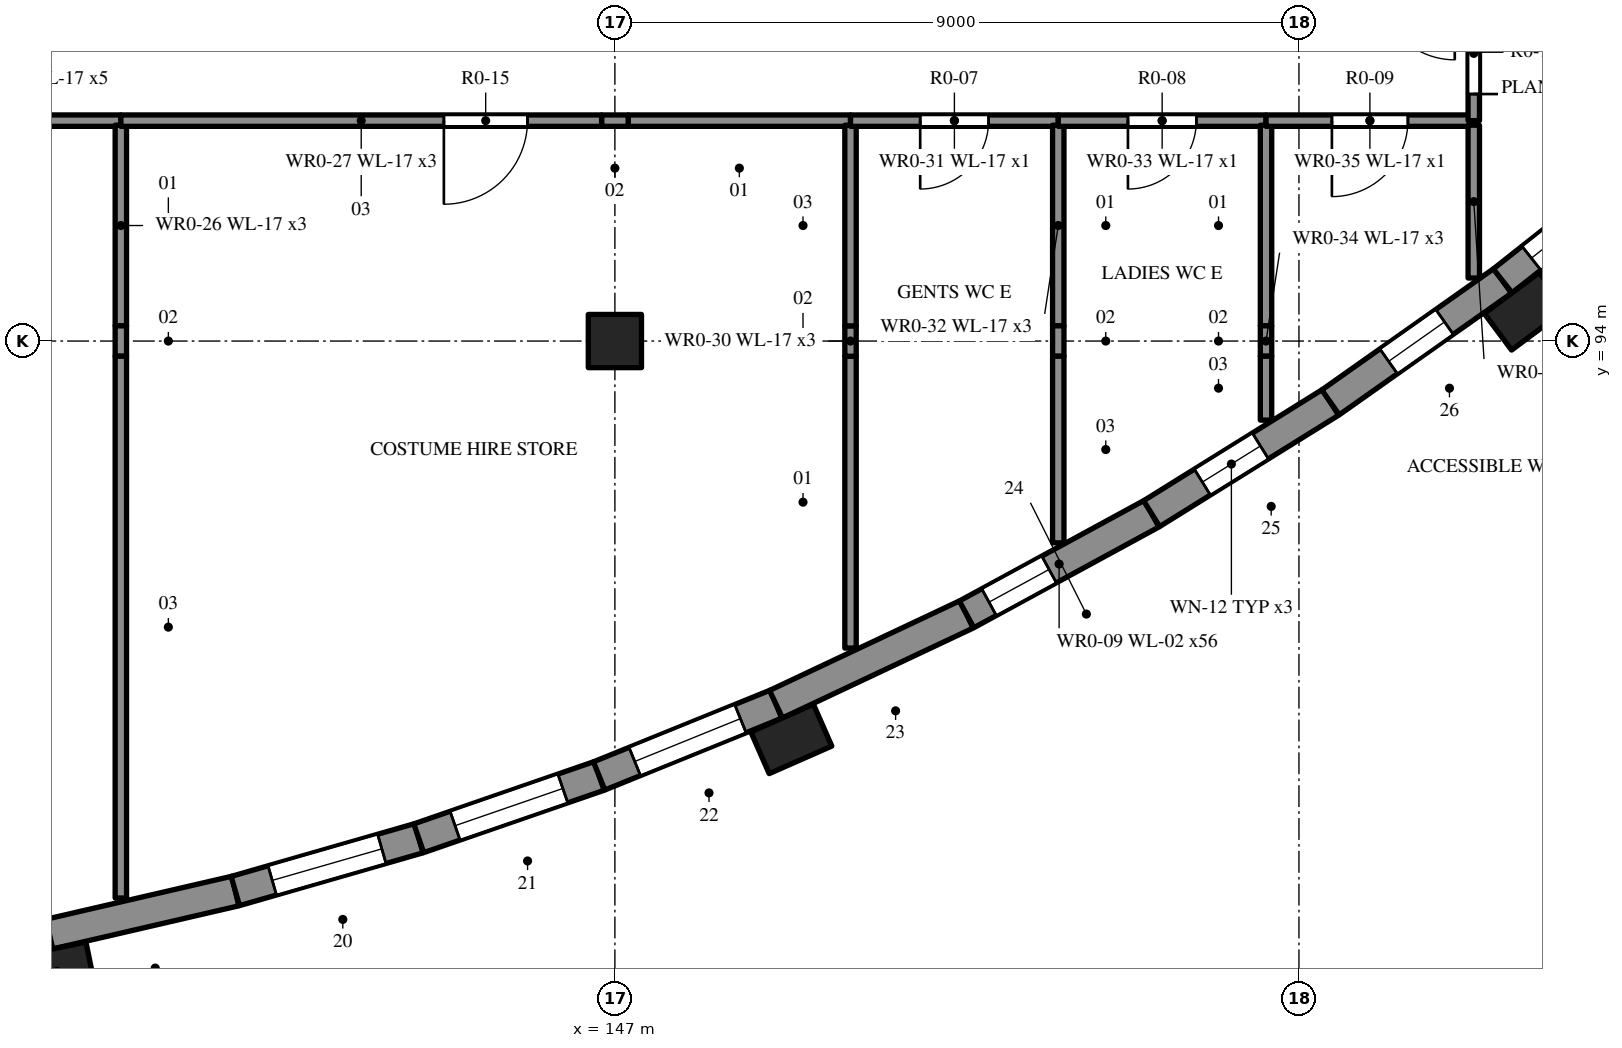
"""IFC4 building model, lengths in metres.
Left out: names, types, materials, properties, quantities, classifications, styles, units other than length and angle.
Written with IfcOpenShell. Run it as: python <this file> out.ifc"""

import sys

from ifc_helpers import new_model, si_unit, direction, frame, frame_2d, origin, origin_2d, place, context, subcontext, project, spatial, rectangle, extrude, element, fill, save


model = new_model("IFC4")
c1 = context("Model", 3, precision=1e-05, world=origin(), true_north=direction((0.0, 1.0)))
c2 = subcontext(c1, "Body", "Model", "MODEL_VIEW")
j1 = project(units=[si_unit("LENGTHUNIT", "METRE"), si_unit("PLANEANGLEUNIT", "RADIAN")], contexts=[c1])
p1 = place(None, origin())
s1 = spatial("IfcSite", under=j1, at=p1, CompositionType="ELEMENT")
p2 = place(p1, origin())
s2 = spatial("IfcBuilding", under=s1, at=p2, CompositionType="ELEMENT")
p3 = place(p2, origin())
s3 = spatial("IfcBuildingStorey", under=s2, at=p3, CompositionType="ELEMENT", Elevation=0.0)
p4 = place(p3, frame((147.0, 94.0, -0.25), z_axis=(0.0, 0.0, 1.0), x_axis=(1.0, 0.0, 0.0)))
e1 = element("IfcColumn", 1, at=p4, inside=s3, PredefinedType="COLUMN", context=c2, shape_type="SweptSolid", body=[
    extrude(rectangle(XDim=0.7, YDim=0.7, at=origin_2d()), origin(), (0.0, 0.0, 1.0), 5.37),
])
p5 = place(p3, frame((139.56, 86.197, -0.25), z_axis=(0.0, 0.0, 1.0), x_axis=(0.974210649093, 0.225640446716, 0.0)))
e2 = element("IfcWall", 2, at=p5, inside=s3, PredefinedType="SOLIDWALL", context=c2, shape_type="SweptSolid", body=[
    extrude(rectangle(XDim=2.511, YDim=0.4, at=frame_2d((1.256, 0.0))), origin(), (0.0, 0.0, 1.0), 5.65),
])
p6 = place(p3, frame((142.006, 86.764, -0.25), z_axis=(0.0, 0.0, 1.0), x_axis=(0.961008605775, 0.276518461637, 0.0)))
e3 = element("IfcWall", 3, at=p6, inside=s3, PredefinedType="SOLIDWALL", context=c2, shape_type="SweptSolid", body=[
    extrude(rectangle(XDim=2.511, YDim=0.4, at=frame_2d((1.255, 0.0))), origin(), (0.0, 0.0, 1.0), 5.65),
])
p7 = place(p6, frame((0.506, 0.0, 2.65)))
e4 = element("IfcOpeningElement", 4, at=p7, cuts=e3, PredefinedType="OPENING", context=c2, shape_type="SweptSolid", body=[
    extrude(rectangle(XDim=1.5, YDim=0.6, at=frame_2d((0.75, 0.3))), frame((0.0, 0.21, 0.0), z_axis=(0.0, -1.0, 0.0), x_axis=(1.0, 0.0, 0.0)), (0.0, 0.0, 1.0), 0.42),
])
p8 = place(p3, frame((144.419, 87.458, -0.25), z_axis=(0.0, 0.0, 1.0), x_axis=(0.94514546406, 0.326649738659, 0.0)))
e5 = element("IfcWall", 5, at=p8, inside=s3, PredefinedType="SOLIDWALL", context=c2, shape_type="SweptSolid", body=[
    extrude(rectangle(XDim=2.511, YDim=0.4, at=frame_2d((1.256, 0.0))), origin(), (0.0, 0.0, 1.0), 5.65),
])
p9 = place(p8, frame((0.506, 0.0, 2.65)))
e6 = element("IfcOpeningElement", 6, at=p9, cuts=e5, PredefinedType="OPENING", context=c2, shape_type="SweptSolid", body=[
    extrude(rectangle(XDim=1.5, YDim=0.6, at=frame_2d((0.75, 0.3))), frame((0.0, 0.21, 0.0), z_axis=(0.0, -1.0, 0.0), x_axis=(1.0, 0.0, 0.0)), (0.0, 0.0, 1.0), 0.42),
])
p10 = place(p3, frame((146.793, 88.278, -0.25), z_axis=(0.0, 0.0, 1.0), x_axis=(0.926722795862, 0.375745738007, 0.0)))
e7 = element("IfcWall", 7, at=p10, inside=s3, PredefinedType="SOLIDWALL", context=c2, shape_type="SweptSolid", body=[
    extrude(rectangle(XDim=2.511, YDim=0.4, at=frame_2d((1.255, 0.0))), origin(), (0.0, 0.0, 1.0), 5.65),
])
p11 = place(p10, frame((0.505, 0.0, 2.65)))
e8 = element("IfcOpeningElement", 8, at=p11, cuts=e7, PredefinedType="OPENING", context=c2, shape_type="SweptSolid", body=[
    extrude(rectangle(XDim=1.5, YDim=0.6, at=frame_2d((0.75, 0.3))), frame((0.0, 0.21, 0.0), z_axis=(0.0, -1.0, 0.0), x_axis=(1.0, 0.0, 0.0)), (0.0, 0.0, 1.0), 0.42),
])
p12 = place(p3, frame((149.12, 89.222, -0.25), z_axis=(0.0, 0.0, 1.0), x_axis=(0.904527098751, 0.42641614372, 0.0)))
e9 = element("IfcWall", 9, at=p12, inside=s3, PredefinedType="SOLIDWALL", context=c2, shape_type="SweptSolid", body=[
    extrude(rectangle(XDim=2.772, YDim=0.4, at=frame_2d((1.386, 0.0))), origin(), (0.0, 0.0, 1.0), 5.65),
])
p13 = place(p3, frame((151.627, 90.404, -0.25), z_axis=(0.0, 0.0, 1.0), x_axis=(0.878292493566, 0.478123724308, 0.0)))
e10 = element("IfcWall", 10, at=p13, inside=s3, PredefinedType="SOLIDWALL", context=c2, shape_type="SweptSolid", body=[
    extrude(rectangle(XDim=2.772, YDim=0.4, at=frame_2d((1.386, 0.0))), origin(), (0.0, 0.0, 1.0), 5.65),
])
p14 = place(p13, frame((0.336, 0.0, 1.85)))
e11 = element("IfcOpeningElement", 11, at=p14, cuts=e10, PredefinedType="OPENING", context=c2, shape_type="SweptSolid", body=[
    extrude(rectangle(XDim=0.9, YDim=0.6, at=frame_2d((0.45, 0.3))), frame((0.0, 0.21, 0.0), z_axis=(0.0, -1.0, 0.0), x_axis=(1.0, 0.0, 0.0)), (0.0, 0.0, 1.0), 0.42),
])
p15 = place(p3, frame((154.062, 91.729, -0.25), z_axis=(0.0, 0.0, 1.0), x_axis=(0.84912946359, 0.528184772653, 0.0)))
e12 = element("IfcWall", 12, at=p15, inside=s3, PredefinedType="SOLIDWALL", context=c2, shape_type="SweptSolid", body=[
    extrude(rectangle(XDim=2.772, YDim=0.4, at=frame_2d((1.386, 0.0))), origin(), (0.0, 0.0, 1.0), 5.65),
])
p16 = place(p15, frame((0.786, 0.0, 1.85)))
e13 = element("IfcOpeningElement", 13, at=p16, cuts=e12, PredefinedType="OPENING", context=c2, shape_type="SweptSolid", body=[
    extrude(rectangle(XDim=0.9, YDim=0.6, at=frame_2d((0.45, 0.3))), frame((0.0, 0.21, 0.0), z_axis=(0.0, -1.0, 0.0), x_axis=(1.0, 0.0, 0.0)), (0.0, 0.0, 1.0), 0.42),
])
p17 = place(p3, frame((156.415, 93.193, -0.25), z_axis=(0.0, 0.0, 1.0), x_axis=(0.817028877428, 0.576596751161, 0.0)))
e14 = element("IfcWall", 14, at=p17, inside=s3, PredefinedType="SOLIDWALL", context=c2, shape_type="SweptSolid", body=[
    extrude(rectangle(XDim=2.772, YDim=0.4, at=frame_2d((1.386, 0.0))), origin(), (0.0, 0.0, 1.0), 5.65),
])
p18 = place(p17, frame((0.936, 0.0, 1.85)))
e15 = element("IfcOpeningElement", 15, at=p18, cuts=e14, PredefinedType="OPENING", context=c2, shape_type="SweptSolid", body=[
    extrude(rectangle(XDim=0.9, YDim=0.6, at=frame_2d((0.45, 0.3))), frame((0.0, 0.21, 0.0), z_axis=(0.0, -1.0, 0.0), x_axis=(1.0, 0.0, 0.0)), (0.0, 0.0, 1.0), 0.42),
])
p19 = place(p3, frame((158.68, 94.792, -0.25), z_axis=(0.0, 0.0, 1.0), x_axis=(0.784278812541, 0.620408530082, 0.0)))
e16 = element("IfcWall", 16, at=p19, inside=s3, PredefinedType="SOLIDWALL", context=c2, shape_type="SweptSolid", body=[
    extrude(rectangle(XDim=2.464, YDim=0.4, at=frame_2d((1.232, 0.0))), origin(), (0.0, 0.0, 1.0), 5.65),
])
p20 = place(p19, frame((0.482, 0.0, 2.65)))
e17 = element("IfcOpeningElement", 17, at=p20, cuts=e16, PredefinedType="OPENING", context=c2, shape_type="SweptSolid", body=[
    extrude(rectangle(XDim=1.5, YDim=0.6, at=frame_2d((0.75, 0.3))), frame((0.0, 0.21, 0.0), z_axis=(0.0, -1.0, 0.0), x_axis=(1.0, 0.0, 0.0)), (0.0, 0.0, 1.0), 0.42),
])
for number, where, z_axis, x_axis in (
    (18, (139.66, 85.707, -0.25), (0.0, 0.0, 1.0), (0.98, 0.201, 0.0)),
    (19, (149.321, 88.764, -0.25), (0.0, 0.0, 1.0), (0.915, 0.403, 0.0)),
    (20, (158.979, 94.391, -0.25), (0.0, 0.0, 1.0), (0.802, 0.597, 0.0)),
):
    element("IfcColumn", number, at=place(p3, frame(where, z_axis=z_axis, x_axis=x_axis)), inside=s3, PredefinedType="PILASTER", context=c2, shape_type="SweptSolid", body=[
        extrude(rectangle(XDim=0.9, YDim=0.6, at=origin_2d()), origin(), (0.0, 0.0, 1.0), 5.65),
    ])
p21 = place(p3, frame((140.5, 96.9, 0.0), z_axis=(0.0, 0.0, 1.0), x_axis=(-1.0, 0.0, 0.0)))
e21 = element("IfcWall", 21, at=p21, inside=s3, PredefinedType="PARTITIONING", context=c2, shape_type="SweptSolid", body=[
    extrude(rectangle(XDim=2.325, YDim=0.15, at=frame_2d((1.163, 0.0))), origin(), (0.0, 0.0, 1.0), 5.12),
])
p22 = place(p3, frame((140.5, 96.84, 0.0), z_axis=(0.0, 0.0, 1.0), x_axis=(0.0, -1.0, 0.0)))
e22 = element("IfcWall", 22, at=p22, inside=s3, PredefinedType="PARTITIONING", context=c2, shape_type="SweptSolid", body=[
    extrude(rectangle(XDim=2.64, YDim=0.15, at=frame_2d((1.32, 0.0))), origin(), (0.0, 0.0, 1.0), 5.12),
])
p23 = place(p3, frame((140.5, 94.2, 0.0), z_axis=(0.0, 0.0, 1.0), x_axis=(0.0, -1.0, 0.0)))
e23 = element("IfcWall", 23, at=p23, inside=s3, PredefinedType="PARTITIONING", context=c2, shape_type="SweptSolid", body=[
    extrude(rectangle(XDim=0.4, YDim=0.15, at=frame_2d((0.2, 0.0))), origin(), (0.0, 0.0, 1.0), 4.32),
])
p24 = place(p3, frame((140.5, 93.8, 0.0), z_axis=(0.0, 0.0, 1.0), x_axis=(0.0, -1.0, 0.0)))
e24 = element("IfcWall", 24, at=p24, inside=s3, PredefinedType="PARTITIONING", context=c2, shape_type="SweptSolid", body=[
    extrude(rectangle(XDim=7.129, YDim=0.15, at=frame_2d((3.564, 0.0))), origin(), (0.0, 0.0, 1.0), 5.12),
])
p25 = place(p3, frame((150.1, 96.9, 0.0), z_axis=(0.0, 0.0, 1.0), x_axis=(-1.0, 0.0, 0.0)))
e25 = element("IfcWall", 25, at=p25, inside=s3, PredefinedType="PARTITIONING", context=c2, shape_type="SweptSolid", body=[
    extrude(rectangle(XDim=2.925, YDim=0.15, at=frame_2d((1.462, 0.0))), origin(), (0.0, 0.0, 1.0), 5.12),
])
p26 = place(p3, frame((147.175, 96.9, 0.0), z_axis=(0.0, 0.0, 1.0), x_axis=(-1.0, 0.0, 0.0)))
e26 = element("IfcWall", 26, at=p26, inside=s3, PredefinedType="PARTITIONING", context=c2, shape_type="SweptSolid", body=[
    extrude(rectangle(XDim=0.35, YDim=0.15, at=frame_2d((0.175, 0.0))), origin(), (0.0, 0.0, 1.0), 4.42),
])
p27 = place(p3, frame((146.825, 96.9, 0.0), z_axis=(0.0, 0.0, 1.0), x_axis=(-1.0, 0.0, 0.0)))
e27 = element("IfcWall", 27, at=p27, inside=s3, PredefinedType="PARTITIONING", context=c2, shape_type="SweptSolid", body=[
    extrude(rectangle(XDim=6.325, YDim=0.15, at=frame_2d((3.163, 0.0))), origin(), (0.0, 0.0, 1.0), 5.12),
])
p28 = place(p27, frame((0.975, 0.0, 0.0)))
e28 = element("IfcOpeningElement", 28, at=p28, cuts=e27, PredefinedType="OPENING", context=c2, shape_type="SweptSolid", body=[
    extrude(rectangle(XDim=1.1, YDim=2.1, at=frame_2d((0.55, 1.05))), frame((0.0, 0.085, 0.0), z_axis=(0.0, -1.0, 0.0), x_axis=(1.0, 0.0, 0.0)), (0.0, 0.0, 1.0), 0.17),
])
p29 = place(p3, frame((150.1, 89.96, 0.0), z_axis=(0.0, 0.0, 1.0), x_axis=(0.0, 1.0, 0.0)))
e29 = element("IfcWall", 29, at=p29, inside=s3, PredefinedType="PARTITIONING", context=c2, shape_type="SweptSolid", body=[
    extrude(rectangle(XDim=3.84, YDim=0.15, at=frame_2d((1.92, 0.0))), origin(), (0.0, 0.0, 1.0), 5.12),
])
p30 = place(p3, frame((150.1, 93.8, 0.0), z_axis=(0.0, 0.0, 1.0), x_axis=(0.0, 1.0, 0.0)))
e30 = element("IfcWall", 30, at=p30, inside=s3, PredefinedType="PARTITIONING", context=c2, shape_type="SweptSolid", body=[
    extrude(rectangle(XDim=0.4, YDim=0.15, at=frame_2d((0.2, 0.0))), origin(), (0.0, 0.0, 1.0), 4.32),
])
p31 = place(p3, frame((150.1, 94.2, 0.0), z_axis=(0.0, 0.0, 1.0), x_axis=(0.0, 1.0, 0.0)))
e31 = element("IfcWall", 31, at=p31, inside=s3, PredefinedType="PARTITIONING", context=c2, shape_type="SweptSolid", body=[
    extrude(rectangle(XDim=2.64, YDim=0.15, at=frame_2d((1.32, 0.0))), origin(), (0.0, 0.0, 1.0), 5.12),
])
p32 = place(p3, frame((152.833, 96.9, 0.0), z_axis=(0.0, 0.0, 1.0), x_axis=(-1.0, 0.0, 0.0)))
e32 = element("IfcWall", 32, at=p32, inside=s3, PredefinedType="PARTITIONING", context=c2, shape_type="SweptSolid", body=[
    extrude(rectangle(XDim=2.733, YDim=0.15, at=frame_2d((1.367, 0.0))), origin(), (0.0, 0.0, 1.0), 5.12),
])
p33 = place(p32, frame((0.917, 0.0, 0.0)))
e33 = element("IfcOpeningElement", 33, at=p33, cuts=e32, PredefinedType="OPENING", context=c2, shape_type="SweptSolid", body=[
    extrude(rectangle(XDim=0.9, YDim=2.1, at=frame_2d((0.45, 1.05))), frame((0.0, 0.085, 0.0), z_axis=(0.0, -1.0, 0.0), x_axis=(1.0, 0.0, 0.0)), (0.0, 0.0, 1.0), 0.17),
])
p34 = place(p3, frame((152.833, 96.84, 0.0), z_axis=(0.0, 0.0, 1.0), x_axis=(0.0, -1.0, 0.0)))
e34 = element("IfcWall", 34, at=p34, inside=s3, PredefinedType="PARTITIONING", context=c2, shape_type="SweptSolid", body=[
    extrude(rectangle(XDim=2.64, YDim=0.15, at=frame_2d((1.32, 0.0))), origin(), (0.0, 0.0, 1.0), 5.12),
])
p35 = place(p3, frame((152.833, 94.2, 0.0), z_axis=(0.0, 0.0, 1.0), x_axis=(0.0, -1.0, 0.0)))
e35 = element("IfcWall", 35, at=p35, inside=s3, PredefinedType="PARTITIONING", context=c2, shape_type="SweptSolid", body=[
    extrude(rectangle(XDim=0.4, YDim=0.15, at=frame_2d((0.2, 0.0))), origin(), (0.0, 0.0, 1.0), 4.32),
])
p36 = place(p3, frame((152.833, 93.8, 0.0), z_axis=(0.0, 0.0, 1.0), x_axis=(0.0, -1.0, 0.0)))
e36 = element("IfcWall", 36, at=p36, inside=s3, PredefinedType="PARTITIONING", context=c2, shape_type="SweptSolid", body=[
    extrude(rectangle(XDim=2.455, YDim=0.15, at=frame_2d((1.228, 0.0))), origin(), (0.0, 0.0, 1.0), 5.12),
])
p37 = place(p3, frame((155.567, 96.9, 0.0), z_axis=(0.0, 0.0, 1.0), x_axis=(-1.0, 0.0, 0.0)))
e37 = element("IfcWall", 37, at=p37, inside=s3, PredefinedType="PARTITIONING", context=c2, shape_type="SweptSolid", body=[
    extrude(rectangle(XDim=2.733, YDim=0.15, at=frame_2d((1.367, 0.0))), origin(), (0.0, 0.0, 1.0), 5.12),
])
p38 = place(p37, frame((0.917, 0.0, 0.0)))
e38 = element("IfcOpeningElement", 38, at=p38, cuts=e37, PredefinedType="OPENING", context=c2, shape_type="SweptSolid", body=[
    extrude(rectangle(XDim=0.9, YDim=2.1, at=frame_2d((0.45, 1.05))), frame((0.0, 0.085, 0.0), z_axis=(0.0, -1.0, 0.0), x_axis=(1.0, 0.0, 0.0)), (0.0, 0.0, 1.0), 0.17),
])
p39 = place(p3, frame((155.567, 96.84, 0.0), z_axis=(0.0, 0.0, 1.0), x_axis=(0.0, -1.0, 0.0)))
e39 = element("IfcWall", 39, at=p39, inside=s3, PredefinedType="PARTITIONING", context=c2, shape_type="SweptSolid", body=[
    extrude(rectangle(XDim=2.64, YDim=0.15, at=frame_2d((1.32, 0.0))), origin(), (0.0, 0.0, 1.0), 5.12),
])
p40 = place(p3, frame((155.567, 94.2, 0.0), z_axis=(0.0, 0.0, 1.0), x_axis=(0.0, -1.0, 0.0)))
e40 = element("IfcWall", 40, at=p40, inside=s3, PredefinedType="PARTITIONING", context=c2, shape_type="SweptSolid", body=[
    extrude(rectangle(XDim=0.4, YDim=0.15, at=frame_2d((0.2, 0.0))), origin(), (0.0, 0.0, 1.0), 4.32),
])
p41 = place(p3, frame((155.567, 93.8, 0.0), z_axis=(0.0, 0.0, 1.0), x_axis=(0.0, -1.0, 0.0)))
e41 = element("IfcWall", 41, at=p41, inside=s3, PredefinedType="PARTITIONING", context=c2, shape_type="SweptSolid", body=[
    extrude(rectangle(XDim=0.84, YDim=0.15, at=frame_2d((0.42, 0.0))), origin(), (0.0, 0.0, 1.0), 5.12),
])
p42 = place(p3, frame((158.3, 96.9, 0.0), z_axis=(0.0, 0.0, 1.0), x_axis=(-1.0, 0.0, 0.0)))
e42 = element("IfcWall", 42, at=p42, inside=s3, PredefinedType="PARTITIONING", context=c2, shape_type="SweptSolid", body=[
    extrude(rectangle(XDim=2.733, YDim=0.15, at=frame_2d((1.367, 0.0))), origin(), (0.0, 0.0, 1.0), 5.12),
])
p43 = place(p42, frame((0.867, 0.0, 0.0)))
e43 = element("IfcOpeningElement", 43, at=p43, cuts=e42, PredefinedType="OPENING", context=c2, shape_type="SweptSolid", body=[
    extrude(rectangle(XDim=1.0, YDim=2.1, at=frame_2d((0.5, 1.05))), frame((0.0, 0.085, 0.0), z_axis=(0.0, -1.0, 0.0), x_axis=(1.0, 0.0, 0.0)), (0.0, 0.0, 1.0), 0.17),
])
p44 = place(p3, frame((158.3, 96.84, 0.0), z_axis=(0.0, 0.0, 1.0), x_axis=(0.0, -1.0, 0.0)))
e44 = element("IfcWall", 44, at=p44, inside=s3, PredefinedType="PARTITIONING", context=c2, shape_type="SweptSolid", body=[
    extrude(rectangle(XDim=2.011, YDim=0.15, at=frame_2d((1.005, 0.0))), origin(), (0.0, 0.0, 1.0), 5.12),
])
p45 = place(p3, frame((158.3, 98.67, 0.0), z_axis=(0.0, 0.0, 1.0), x_axis=(0.0, -1.0, 0.0)))
e45 = element("IfcWall", 45, at=p45, inside=s3, PredefinedType="PARTITIONING", context=c2, shape_type="SweptSolid", body=[
    extrude(rectangle(XDim=1.77, YDim=0.15, at=frame_2d((0.885, 0.0))), origin(), (0.0, 0.0, 1.0), 5.12),
])
p46 = place(p45, frame((0.32, 0.0, 0.0)))
e46 = element("IfcOpeningElement", 46, at=p46, cuts=e45, PredefinedType="OPENING", context=c2, shape_type="SweptSolid", body=[
    extrude(rectangle(XDim=1.1, YDim=2.1, at=frame_2d((0.55, 1.05))), frame((0.0, 0.085, 0.0), z_axis=(0.0, -1.0, 0.0), x_axis=(1.0, 0.0, 0.0)), (0.0, 0.0, 1.0), 0.17),
])
p47 = place(p7, origin())
e47 = element("IfcWindow", 47, at=p47, inside=s3, PartitioningType="SINGLE_PANEL", PredefinedType="WINDOW", context=c2, shape_type="SweptSolid", body=[
    extrude(rectangle(XDim=1.5, YDim=0.6, at=frame_2d((0.75, 0.3))), frame((0.0, 0.03, 0.0), z_axis=(0.0, -1.0, 0.0), x_axis=(1.0, 0.0, 0.0)), (0.0, 0.0, 1.0), 0.06),
])
fill(e4, e47)
p48 = place(p9, origin())
e48 = element("IfcWindow", 48, at=p48, inside=s3, PartitioningType="SINGLE_PANEL", PredefinedType="WINDOW", context=c2, shape_type="SweptSolid", body=[
    extrude(rectangle(XDim=1.5, YDim=0.6, at=frame_2d((0.75, 0.3))), frame((0.0, 0.03, 0.0), z_axis=(0.0, -1.0, 0.0), x_axis=(1.0, 0.0, 0.0)), (0.0, 0.0, 1.0), 0.06),
])
fill(e6, e48)
p49 = place(p11, origin())
e49 = element("IfcWindow", 49, at=p49, inside=s3, PartitioningType="SINGLE_PANEL", PredefinedType="WINDOW", context=c2, shape_type="SweptSolid", body=[
    extrude(rectangle(XDim=1.5, YDim=0.6, at=frame_2d((0.75, 0.3))), frame((0.0, 0.03, 0.0), z_axis=(0.0, -1.0, 0.0), x_axis=(1.0, 0.0, 0.0)), (0.0, 0.0, 1.0), 0.06),
])
fill(e8, e49)
p50 = place(p14, origin())
e50 = element("IfcWindow", 50, at=p50, inside=s3, PartitioningType="SINGLE_PANEL", PredefinedType="WINDOW", context=c2, shape_type="SweptSolid", body=[
    extrude(rectangle(XDim=0.9, YDim=0.6, at=frame_2d((0.45, 0.3))), frame((0.0, 0.03, 0.0), z_axis=(0.0, -1.0, 0.0), x_axis=(1.0, 0.0, 0.0)), (0.0, 0.0, 1.0), 0.06),
])
fill(e11, e50)
p51 = place(p16, origin())
e51 = element("IfcWindow", 51, at=p51, inside=s3, PartitioningType="SINGLE_PANEL", PredefinedType="WINDOW", context=c2, shape_type="SweptSolid", body=[
    extrude(rectangle(XDim=0.9, YDim=0.6, at=frame_2d((0.45, 0.3))), frame((0.0, 0.03, 0.0), z_axis=(0.0, -1.0, 0.0), x_axis=(1.0, 0.0, 0.0)), (0.0, 0.0, 1.0), 0.06),
])
fill(e13, e51)
p52 = place(p18, origin())
e52 = element("IfcWindow", 52, at=p52, inside=s3, PartitioningType="SINGLE_PANEL", PredefinedType="WINDOW", context=c2, shape_type="SweptSolid", body=[
    extrude(rectangle(XDim=0.9, YDim=0.6, at=frame_2d((0.45, 0.3))), frame((0.0, 0.03, 0.0), z_axis=(0.0, -1.0, 0.0), x_axis=(1.0, 0.0, 0.0)), (0.0, 0.0, 1.0), 0.06),
])
fill(e15, e52)
p53 = place(p20, origin())
e53 = element("IfcWindow", 53, at=p53, inside=s3, PartitioningType="SINGLE_PANEL", PredefinedType="WINDOW", context=c2, shape_type="SweptSolid", body=[
    extrude(rectangle(XDim=1.5, YDim=0.6, at=frame_2d((0.75, 0.3))), frame((0.0, 0.03, 0.0), z_axis=(0.0, -1.0, 0.0), x_axis=(1.0, 0.0, 0.0)), (0.0, 0.0, 1.0), 0.06),
])
fill(e17, e53)
p54 = place(p33, origin())
e54 = element("IfcDoor", 54, at=p54, inside=s3, OperationType="SINGLE_SWING_RIGHT", PredefinedType="DOOR", context=c2, shape_type="SweptSolid", body=[
    extrude(rectangle(XDim=0.9, YDim=2.1, at=frame_2d((0.45, 1.05))), frame((0.0, 0.025, 0.0), z_axis=(0.0, -1.0, 0.0), x_axis=(1.0, 0.0, 0.0)), (0.0, 0.0, 1.0), 0.05),
])
fill(e33, e54)
p55 = place(p38, origin())
e55 = element("IfcDoor", 55, at=p55, inside=s3, OperationType="SINGLE_SWING_RIGHT", PredefinedType="DOOR", context=c2, shape_type="SweptSolid", body=[
    extrude(rectangle(XDim=0.9, YDim=2.1, at=frame_2d((0.45, 1.05))), frame((0.0, 0.025, 0.0), z_axis=(0.0, -1.0, 0.0), x_axis=(1.0, 0.0, 0.0)), (0.0, 0.0, 1.0), 0.05),
])
fill(e38, e55)
p56 = place(p43, origin())
e56 = element("IfcDoor", 56, at=p56, inside=s3, OperationType="SINGLE_SWING_RIGHT", PredefinedType="DOOR", context=c2, shape_type="SweptSolid", body=[
    extrude(rectangle(XDim=1.0, YDim=2.1, at=frame_2d((0.5, 1.05))), frame((0.0, 0.025, 0.0), z_axis=(0.0, -1.0, 0.0), x_axis=(1.0, 0.0, 0.0)), (0.0, 0.0, 1.0), 0.05),
])
fill(e43, e56)
p57 = place(p46, origin())
e57 = element("IfcDoor", 57, at=p57, inside=s3, OperationType="SINGLE_SWING_RIGHT", PredefinedType="DOOR", context=c2, shape_type="SweptSolid", body=[
    extrude(rectangle(XDim=1.1, YDim=2.1, at=frame_2d((0.55, 1.05))), frame((0.0, 0.025, 0.0), z_axis=(0.0, -1.0, 0.0), x_axis=(1.0, 0.0, 0.0)), (0.0, 0.0, 1.0), 0.05),
])
fill(e46, e57)
p58 = place(p28, origin())
e58 = element("IfcDoor", 58, at=p58, inside=s3, OperationType="SINGLE_SWING_RIGHT", PredefinedType="DOOR", context=c2, shape_type="SweptSolid", body=[
    extrude(rectangle(XDim=1.1, YDim=2.1, at=frame_2d((0.55, 1.05))), frame((0.0, 0.025, 0.0), z_axis=(0.0, -1.0, 0.0), x_axis=(1.0, 0.0, 0.0)), (0.0, 0.0, 1.0), 0.05),
])
fill(e28, e58)
save(model, sys.argv[1])
